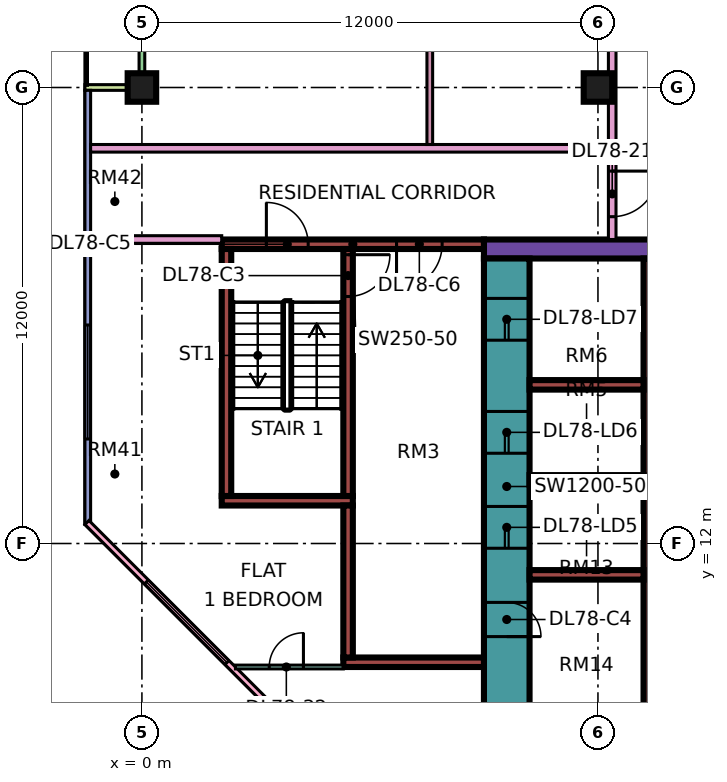
"""IFC4 building model, lengths in metres.
Left out: names, types, materials, properties, quantities, classifications, styles, units other than length and angle.
Written with IfcOpenShell. Run it as: python <this file> out.ifc"""

import sys

from ifc_helpers import new_model, si_unit, direction, frame, frame_2d, origin, origin_2d, place, context, subcontext, project, spatial, rectangle, extrude, element, fill, save


model = new_model("IFC4")
c1 = context("Model", 3, precision=1e-05, world=origin(), true_north=direction((0.0, 1.0)))
c2 = subcontext(c1, "Body", "Model", "MODEL_VIEW")
j1 = project(units=[si_unit("LENGTHUNIT", "METRE"), si_unit("PLANEANGLEUNIT", "RADIAN")], contexts=[c1])
p1 = place(None, origin())
s1 = spatial("IfcSite", under=j1, at=p1, CompositionType="ELEMENT")
p2 = place(p1, origin())
s2 = spatial("IfcBuilding", under=s1, at=p2, CompositionType="ELEMENT")
p3 = place(p2, frame((0.0, 0.0, 338.9)))
s3 = spatial("IfcBuildingStorey", under=s2, at=p3, CompositionType="ELEMENT", Elevation=338.9)
for number, where, z_axis, x_axis in (
    (1, (0.0, 24.0, 0.0), (0.0, 0.0, 1.0), (1.0, 0.0, 0.0)),
    (2, (12.0, 24.0, 0.0), (0.0, 0.0, 1.0), (1.0, 0.0, 0.0)),
):
    element("IfcColumn", number, at=place(p3, frame(where, z_axis=z_axis, x_axis=x_axis)), inside=s3, PredefinedType="COLUMN", context=c2, shape_type="SweptSolid", body=[
        extrude(rectangle(XDim=0.75, YDim=0.75, at=origin_2d()), origin(), (0.0, 0.0, 1.0), 3.75),
    ])
p4 = place(p3, frame((9.0, 19.75, 0.0), z_axis=(0.0, 0.0, 1.0), x_axis=(1.0, 0.0, 0.0)))
e3 = element("IfcWall", 3, at=p4, inside=s3, PredefinedType="SHEAR", context=c2, shape_type="SweptSolid", body=[
    extrude(rectangle(XDim=25.0, YDim=0.5, at=frame_2d((12.5, 0.0))), origin(), (0.0, 0.0, 1.0), 3.75),
])
p5 = place(p4, frame((19.1, 0.0, 0.0)))
e4 = element("IfcOpeningElement", 4, at=p5, cuts=e3, PredefinedType="OPENING", context=c2, shape_type="SweptSolid", body=[
    extrude(rectangle(XDim=1.8, YDim=2.4, at=frame_2d((0.9, 1.2))), frame((0.0, 0.26, 0.0), z_axis=(0.0, -1.0, 0.0), x_axis=(1.0, 0.0, 0.0)), (0.0, 0.0, 1.0), 0.52),
])
p6 = place(p3, frame((9.6, 7.5, 0.0), z_axis=(0.0, 0.0, 1.0), x_axis=(0.0, 1.0, 0.0)))
e5 = element("IfcWall", 5, at=p6, inside=s3, PredefinedType="SHEAR", context=c2, shape_type="SweptSolid", body=[
    extrude(rectangle(XDim=12.0, YDim=1.2, at=frame_2d((6.0, 0.0))), origin(), (0.0, 0.0, 1.0), 3.75),
])
p7 = place(p6, frame((4.375, 0.0, 0.0)))
e6 = element("IfcOpeningElement", 6, at=p7, cuts=e5, PredefinedType="OPENING", context=c2, shape_type="SweptSolid", body=[
    extrude(rectangle(XDim=1.1, YDim=2.2, at=frame_2d((0.55, 1.1))), frame((0.0, 0.61, 0.0), z_axis=(0.0, -1.0, 0.0), x_axis=(1.0, 0.0, 0.0)), (0.0, 0.0, 1.0), 1.22),
])
p8 = place(p6, frame((6.875, 0.0, 0.0)))
e7 = element("IfcOpeningElement", 7, at=p8, cuts=e5, PredefinedType="OPENING", context=c2, shape_type="SweptSolid", body=[
    extrude(rectangle(XDim=1.1, YDim=2.2, at=frame_2d((0.55, 1.1))), frame((0.0, 0.61, 0.0), z_axis=(0.0, -1.0, 0.0), x_axis=(1.0, 0.0, 0.0)), (0.0, 0.0, 1.0), 1.22),
])
p9 = place(p6, frame((9.85, 0.0, 0.0)))
e8 = element("IfcOpeningElement", 8, at=p9, cuts=e5, PredefinedType="OPENING", context=c2, shape_type="SweptSolid", body=[
    extrude(rectangle(XDim=1.1, YDim=2.2, at=frame_2d((0.55, 1.1))), frame((0.0, 0.61, 0.0), z_axis=(0.0, -1.0, 0.0), x_axis=(1.0, 0.0, 0.0)), (0.0, 0.0, 1.0), 1.22),
])
p10 = place(p6, frame((2.05, 0.0, 0.0)))
e9 = element("IfcOpeningElement", 9, at=p10, cuts=e5, PredefinedType="OPENING", context=c2, shape_type="SweptSolid", body=[
    extrude(rectangle(XDim=0.9, YDim=2.1, at=frame_2d((0.45, 1.05))), frame((0.0, 0.61, 0.0), z_axis=(0.0, -1.0, 0.0), x_axis=(1.0, 0.0, 0.0)), (0.0, 0.0, 1.0), 1.22),
])
p11 = place(p3, frame((13.325, 7.5, 0.0), z_axis=(0.0, 0.0, 1.0), x_axis=(0.0, 1.0, 0.0)))
e10 = element("IfcWall", 10, at=p11, inside=s3, PredefinedType="SHEAR", context=c2, shape_type="SweptSolid", body=[
    extrude(rectangle(XDim=12.0, YDim=0.25, at=frame_2d((6.0, 0.0))), origin(), (0.0, 0.0, 1.0), 3.75),
])
for number, where, z_axis, x_axis in (
    (11, (10.2, 11.175, 0.0), (0.0, 0.0, 1.0), (1.0, 0.0, 0.0)),
    (12, (10.2, 13.675, 0.0), (0.0, 0.0, 1.0), (1.0, 0.0, 0.0)),
    (13, (10.2, 16.175, 0.0), (0.0, 0.0, 1.0), (1.0, 0.0, 0.0)),
):
    element("IfcWall", number, at=place(p3, frame(where, z_axis=z_axis, x_axis=x_axis)), inside=s3, PredefinedType="SHEAR", context=c2, shape_type="SweptSolid", body=[
        extrude(rectangle(XDim=3.0, YDim=0.25, at=frame_2d((1.5, 0.0))), origin(), (0.0, 0.0, 1.0), 3.75),
    ])
p12 = place(p3, frame((2.1, 19.875, 0.0), z_axis=(0.0, 0.0, 1.0), x_axis=(1.0, 0.0, 0.0)))
e14 = element("IfcWall", 14, at=p12, inside=s3, PredefinedType="SHEAR", context=c2, shape_type="SweptSolid", body=[
    extrude(rectangle(XDim=6.9, YDim=0.25, at=frame_2d((3.45, 0.0))), origin(), (0.0, 0.0, 1.0), 3.75),
])
p13 = place(p12, frame((1.175, 0.0, 0.0)))
e15 = element("IfcOpeningElement", 15, at=p13, cuts=e14, PredefinedType="OPENING", context=c2, shape_type="SweptSolid", body=[
    extrude(rectangle(XDim=1.1, YDim=2.2, at=frame_2d((0.55, 1.1))), frame((0.0, 0.135, 0.0), z_axis=(0.0, -1.0, 0.0), x_axis=(1.0, 0.0, 0.0)), (0.0, 0.0, 1.0), 0.27),
])
p14 = place(p12, frame((4.6, 0.0, 0.0)))
e16 = element("IfcOpeningElement", 16, at=p14, cuts=e14, PredefinedType="OPENING", context=c2, shape_type="SweptSolid", body=[
    extrude(rectangle(XDim=1.2, YDim=2.2, at=frame_2d((0.6, 1.1))), frame((0.0, 0.135, 0.0), z_axis=(0.0, -1.0, 0.0), x_axis=(1.0, 0.0, 0.0)), (0.0, 0.0, 1.0), 0.27),
])
p15 = place(p3, frame((2.1, 13.125, 0.0), z_axis=(0.0, 0.0, 1.0), x_axis=(1.0, 0.0, 0.0)))
e17 = element("IfcWall", 17, at=p15, inside=s3, PredefinedType="SHEAR", context=c2, shape_type="SweptSolid", body=[
    extrude(rectangle(XDim=3.45, YDim=0.25, at=frame_2d((1.725, 0.0))), origin(), (0.0, 0.0, 1.0), 3.75),
])
p16 = place(p3, frame((2.225, 13.25, 0.0), z_axis=(0.0, 0.0, 1.0), x_axis=(0.0, 1.0, 0.0)))
e18 = element("IfcWall", 18, at=p16, inside=s3, PredefinedType="SHEAR", context=c2, shape_type="SweptSolid", body=[
    extrude(rectangle(XDim=6.5, YDim=0.25, at=frame_2d((3.25, 0.0))), origin(), (0.0, 0.0, 1.0), 3.75),
])
p17 = place(p3, frame((5.425, 13.25, 0.0), z_axis=(0.0, 0.0, 1.0), x_axis=(0.0, 1.0, 0.0)))
e19 = element("IfcWall", 19, at=p17, inside=s3, PredefinedType="SHEAR", context=c2, shape_type="SweptSolid", body=[
    extrude(rectangle(XDim=6.5, YDim=0.25, at=frame_2d((3.25, 0.0))), origin(), (0.0, 0.0, 1.0), 3.75),
])
p18 = place(p17, frame((5.25, 0.0, 0.0)))
e20 = element("IfcOpeningElement", 20, at=p18, cuts=e19, PredefinedType="OPENING", context=c2, shape_type="SweptSolid", body=[
    extrude(rectangle(XDim=1.1, YDim=2.2, at=frame_2d((0.55, 1.1))), frame((0.0, 0.135, 0.0), z_axis=(0.0, -1.0, 0.0), x_axis=(1.0, 0.0, 0.0)), (0.0, 0.0, 1.0), 0.27),
])
p19 = place(p3, frame((5.3, 8.875, 0.0), z_axis=(0.0, 0.0, 1.0), x_axis=(1.0, 0.0, 0.0)))
e21 = element("IfcWall", 21, at=p19, inside=s3, PredefinedType="SHEAR", context=c2, shape_type="SweptSolid", body=[
    extrude(rectangle(XDim=3.7, YDim=0.25, at=frame_2d((1.85, 0.0))), origin(), (0.0, 0.0, 1.0), 3.75),
])
p20 = place(p3, frame((5.425, 9.0, 0.0), z_axis=(0.0, 0.0, 1.0), x_axis=(0.0, 1.0, 0.0)))
e22 = element("IfcWall", 22, at=p20, inside=s3, PredefinedType="SHEAR", context=c2, shape_type="SweptSolid", body=[
    extrude(rectangle(XDim=4.0, YDim=0.25, at=frame_2d((2.0, 0.0))), origin(), (0.0, 0.0, 1.0), 3.75),
])
p21 = place(p3, frame((0.0, 35.925, 0.0), z_axis=(0.0, 0.0, 1.0), x_axis=(0.0, -1.0, 0.0)))
e23 = element("IfcWall", 23, at=p21, inside=s3, PredefinedType="SOLIDWALL", context=c2, shape_type="SweptSolid", body=[
    extrude(rectangle(XDim=11.85, YDim=0.15, at=frame_2d((5.925, 0.0))), origin(), (0.0, 0.0, 1.0), 3.35),
])
p22 = place(p21, frame((2.262, 0.0, 0.0)))
e24 = element("IfcOpeningElement", 24, at=p22, cuts=e23, PredefinedType="OPENING", context=c2, shape_type="SweptSolid", body=[
    extrude(rectangle(XDim=1.8, YDim=2.4, at=frame_2d((0.9, 1.2))), frame((0.0, 0.085, 0.0), z_axis=(0.0, -1.0, 0.0), x_axis=(1.0, 0.0, 0.0)), (0.0, 0.0, 1.0), 0.17),
])
p23 = place(p21, frame((7.188, 0.0, 0.45)))
e25 = element("IfcOpeningElement", 25, at=p23, cuts=e23, PredefinedType="OPENING", context=c2, shape_type="SweptSolid", body=[
    extrude(rectangle(XDim=3.0, YDim=2.4, at=frame_2d((1.5, 1.2))), frame((0.0, 0.085, 0.0), z_axis=(0.0, -1.0, 0.0), x_axis=(1.0, 0.0, 0.0)), (0.0, 0.0, 1.0), 0.17),
])
p24 = place(p3, frame((-1.5, 24.0, 0.0), z_axis=(0.0, 0.0, 1.0), x_axis=(1.0, 0.0, 0.0)))
e26 = element("IfcWall", 26, at=p24, inside=s3, PredefinedType="SOLIDWALL", context=c2, shape_type="SweptSolid", body=[
    extrude(rectangle(XDim=1.5, YDim=0.15, at=frame_2d((0.75, 0.0))), origin(), (0.0, 0.0, 1.0), 3.35),
])
p25 = place(p3, frame((-1.425, 23.925, 0.0), z_axis=(0.0, 0.0, 1.0), x_axis=(0.0, -1.0, 0.0)))
e27 = element("IfcWall", 27, at=p25, inside=s3, PredefinedType="SOLIDWALL", context=c2, shape_type="SweptSolid", body=[
    extrude(rectangle(XDim=11.425, YDim=0.15, at=frame_2d((5.712, 0.0))), origin(), (0.0, 0.0, 1.0), 3.35),
])
p26 = place(p25, frame((6.175, 0.0, 0.45)))
e28 = element("IfcOpeningElement", 28, at=p26, cuts=e27, PredefinedType="OPENING", context=c2, shape_type="SweptSolid", body=[
    extrude(rectangle(XDim=3.0, YDim=2.4, at=frame_2d((1.5, 1.2))), frame((0.0, 0.085, 0.0), z_axis=(0.0, -1.0, 0.0), x_axis=(1.0, 0.0, 0.0)), (0.0, 0.0, 1.0), 0.17),
])
p27 = place(p3, frame((-1.447, 12.553, 0.0), z_axis=(0.0, 0.0, 1.0), x_axis=(0.707106781187, -0.707106781187, 0.0)))
e29 = element("IfcWall", 29, at=p27, inside=s3, PredefinedType="SOLIDWALL", context=c2, shape_type="SweptSolid", body=[
    extrude(rectangle(XDim=19.799, YDim=0.15, at=frame_2d((9.899, 0.0))), origin(), (0.0, 0.0, 1.0), 3.35),
])
p28 = place(p27, frame((2.212, 0.0, 0.45)))
e30 = element("IfcOpeningElement", 30, at=p28, cuts=e29, PredefinedType="OPENING", context=c2, shape_type="SweptSolid", body=[
    extrude(rectangle(XDim=3.0, YDim=2.4, at=frame_2d((1.5, 1.2))), frame((0.0, 0.085, 0.0), z_axis=(0.0, -1.0, 0.0), x_axis=(1.0, 0.0, 0.0)), (0.0, 0.0, 1.0), 0.17),
])
p29 = place(p27, frame((10.216, 0.0, 0.45)))
e31 = element("IfcOpeningElement", 31, at=p29, cuts=e29, PredefinedType="OPENING", context=c2, shape_type="SweptSolid", body=[
    extrude(rectangle(XDim=3.0, YDim=2.4, at=frame_2d((1.5, 1.2))), frame((0.0, 0.085, 0.0), z_axis=(0.0, -1.0, 0.0), x_axis=(1.0, 0.0, 0.0)), (0.0, 0.0, 1.0), 0.17),
])
p30 = place(p3, frame((-1.35, 20.0, 0.0), z_axis=(0.0, 0.0, 1.0), x_axis=(1.0, 0.0, 0.0)))
e32 = element("IfcWall", 32, at=p30, inside=s3, PredefinedType="PARTITIONING", context=c2, shape_type="SweptSolid", body=[
    extrude(rectangle(XDim=3.45, YDim=0.2, at=frame_2d((1.725, 0.0))), origin(), (0.0, 0.0, 1.0), 3.35),
])
p31 = place(p3, frame((-1.35, 22.4, 0.0), z_axis=(0.0, 0.0, 1.0), x_axis=(1.0, 0.0, 0.0)))
e33 = element("IfcWall", 33, at=p31, inside=s3, PredefinedType="PARTITIONING", context=c2, shape_type="SweptSolid", body=[
    extrude(rectangle(XDim=13.625, YDim=0.2, at=frame_2d((6.812, 0.0))), origin(), (0.0, 0.0, 1.0), 3.35),
])
p32 = place(p3, frame((2.461, 8.75, 0.0), z_axis=(0.0, 0.0, 1.0), x_axis=(1.0, 0.0, 0.0)))
e34 = element("IfcWall", 34, at=p32, inside=s3, PredefinedType="PARTITIONING", context=c2, shape_type="SweptSolid", body=[
    extrude(rectangle(XDim=2.839, YDim=0.1, at=frame_2d((1.419, 0.0))), origin(), (0.0, 0.0, 1.0), 3.35),
])
p33 = place(p32, frame((0.889, 0.0, 0.0)))
e35 = element("IfcOpeningElement", 35, at=p33, cuts=e34, PredefinedType="OPENING", context=c2, shape_type="SweptSolid", body=[
    extrude(rectangle(XDim=0.9, YDim=2.1, at=frame_2d((0.45, 1.05))), frame((0.0, 0.06, 0.0), z_axis=(0.0, -1.0, 0.0), x_axis=(1.0, 0.0, 0.0)), (0.0, 0.0, 1.0), 0.12),
])
p34 = place(p3, frame((7.575, 22.5, 0.0), z_axis=(0.0, 0.0, 1.0), x_axis=(0.0, 1.0, 0.0)))
e36 = element("IfcWall", 36, at=p34, inside=s3, PredefinedType="PARTITIONING", context=c2, shape_type="SweptSolid", body=[
    extrude(rectangle(XDim=10.875, YDim=0.15, at=frame_2d((5.438, 0.0))), origin(), (0.0, 0.0, 1.0), 3.35),
])
p35 = place(p34, frame((8.85, 0.0, 0.0)))
e37 = element("IfcOpeningElement", 37, at=p35, cuts=e36, PredefinedType="OPENING", context=c2, shape_type="SweptSolid", body=[
    extrude(rectangle(XDim=0.8, YDim=2.1, at=frame_2d((0.4, 1.05))), frame((0.0, 0.085, 0.0), z_axis=(0.0, -1.0, 0.0), x_axis=(1.0, 0.0, 0.0)), (0.0, 0.0, 1.0), 0.17),
])
p36 = place(p34, frame((3.35, 0.0, 0.0)))
e38 = element("IfcOpeningElement", 38, at=p36, cuts=e36, PredefinedType="OPENING", context=c2, shape_type="SweptSolid", body=[
    extrude(rectangle(XDim=0.9, YDim=2.1, at=frame_2d((0.45, 1.05))), frame((0.0, 0.085, 0.0), z_axis=(0.0, -1.0, 0.0), x_axis=(1.0, 0.0, 0.0)), (0.0, 0.0, 1.0), 0.17),
])
p37 = place(p3, frame((12.375, 20.0, 0.0), z_axis=(0.0, 0.0, 1.0), x_axis=(0.0, 1.0, 0.0)))
e39 = element("IfcWall", 39, at=p37, inside=s3, PredefinedType="PARTITIONING", context=c2, shape_type="SweptSolid", body=[
    extrude(rectangle(XDim=34.0, YDim=0.2, at=frame_2d((17.0, 0.0))), origin(), (0.0, 0.0, 1.0), 3.35),
])
p38 = place(p37, frame((31.8, 0.0, 0.0)))
e40 = element("IfcOpeningElement", 40, at=p38, cuts=e39, PredefinedType="OPENING", context=c2, shape_type="SweptSolid", body=[
    extrude(rectangle(XDim=1.0, YDim=2.1, at=frame_2d((0.5, 1.05))), frame((0.0, 0.11, 0.0), z_axis=(0.0, -1.0, 0.0), x_axis=(1.0, 0.0, 0.0)), (0.0, 0.0, 1.0), 0.22),
])
p39 = place(p37, frame((0.6, 0.0, 0.0)))
e41 = element("IfcOpeningElement", 41, at=p39, cuts=e39, PredefinedType="OPENING", context=c2, shape_type="SweptSolid", body=[
    extrude(rectangle(XDim=1.2, YDim=2.1, at=frame_2d((0.6, 1.05))), frame((0.0, 0.11, 0.0), z_axis=(0.0, -1.0, 0.0), x_axis=(1.0, 0.0, 0.0)), (0.0, 0.0, 1.0), 0.22),
])
p40 = place(p37, frame((14.1, 0.0, 0.0)))
e42 = element("IfcOpeningElement", 42, at=p40, cuts=e39, PredefinedType="OPENING", context=c2, shape_type="SweptSolid", body=[
    extrude(rectangle(XDim=1.0, YDim=2.1, at=frame_2d((0.5, 1.05))), frame((0.0, 0.11, 0.0), z_axis=(0.0, -1.0, 0.0), x_axis=(1.0, 0.0, 0.0)), (0.0, 0.0, 1.0), 0.22),
])
p41 = place(p26, origin())
e43 = element("IfcWindow", 43, at=p41, inside=s3, PartitioningType="SINGLE_PANEL", PredefinedType="WINDOW", context=c2, shape_type="SweptSolid", body=[
    extrude(rectangle(XDim=3.0, YDim=2.4, at=frame_2d((1.5, 1.2))), frame((0.0, 0.03, 0.0), z_axis=(0.0, -1.0, 0.0), x_axis=(1.0, 0.0, 0.0)), (0.0, 0.0, 1.0), 0.06),
])
fill(e28, e43)
p42 = place(p28, origin())
e44 = element("IfcWindow", 44, at=p42, inside=s3, PartitioningType="SINGLE_PANEL", PredefinedType="WINDOW", context=c2, shape_type="SweptSolid", body=[
    extrude(rectangle(XDim=3.0, YDim=2.4, at=frame_2d((1.5, 1.2))), frame((0.0, 0.03, 0.0), z_axis=(0.0, -1.0, 0.0), x_axis=(1.0, 0.0, 0.0)), (0.0, 0.0, 1.0), 0.06),
])
fill(e30, e44)
p43 = place(p7, origin())
e45 = element("IfcDoor", 45, at=p43, inside=s3, OperationType="DOUBLE_DOOR_SLIDING", PredefinedType="DOOR", context=c2, shape_type="SweptSolid", body=[
    extrude(rectangle(XDim=1.1, YDim=2.2, at=frame_2d((0.55, 1.1))), frame((0.0, 0.025, 0.0), z_axis=(0.0, -1.0, 0.0), x_axis=(1.0, 0.0, 0.0)), (0.0, 0.0, 1.0), 0.05),
])
fill(e6, e45)
p44 = place(p8, origin())
e46 = element("IfcDoor", 46, at=p44, inside=s3, OperationType="DOUBLE_DOOR_SLIDING", PredefinedType="DOOR", context=c2, shape_type="SweptSolid", body=[
    extrude(rectangle(XDim=1.1, YDim=2.2, at=frame_2d((0.55, 1.1))), frame((0.0, 0.025, 0.0), z_axis=(0.0, -1.0, 0.0), x_axis=(1.0, 0.0, 0.0)), (0.0, 0.0, 1.0), 0.05),
])
fill(e7, e46)
p45 = place(p9, origin())
e47 = element("IfcDoor", 47, at=p45, inside=s3, OperationType="DOUBLE_DOOR_SLIDING", PredefinedType="DOOR", context=c2, shape_type="SweptSolid", body=[
    extrude(rectangle(XDim=1.1, YDim=2.2, at=frame_2d((0.55, 1.1))), frame((0.0, 0.025, 0.0), z_axis=(0.0, -1.0, 0.0), x_axis=(1.0, 0.0, 0.0)), (0.0, 0.0, 1.0), 0.05),
])
fill(e8, e47)
p46 = place(p18, origin())
e48 = element("IfcDoor", 48, at=p46, inside=s3, OperationType="SINGLE_SWING_RIGHT", PredefinedType="DOOR", context=c2, shape_type="SweptSolid", body=[
    extrude(rectangle(XDim=1.1, YDim=2.2, at=frame_2d((0.55, 1.1))), frame((0.0, 0.025, 0.0), z_axis=(0.0, -1.0, 0.0), x_axis=(1.0, 0.0, 0.0)), (0.0, 0.0, 1.0), 0.05),
])
fill(e20, e48)
p47 = place(p10, frame((0.9, 0.0, 0.0), z_axis=(0.0, 0.0, 1.0), x_axis=(-1.0, 0.0, 0.0)))
e49 = element("IfcDoor", 49, at=p47, inside=s3, OperationType="SINGLE_SWING_LEFT", PredefinedType="DOOR", context=c2, shape_type="SweptSolid", body=[
    extrude(rectangle(XDim=0.9, YDim=2.1, at=frame_2d((0.45, 1.05))), frame((0.0, 0.025, 0.0), z_axis=(0.0, -1.0, 0.0), x_axis=(1.0, 0.0, 0.0)), (0.0, 0.0, 1.0), 0.05),
])
fill(e9, e49)
p48 = place(p13, origin())
e50 = element("IfcDoor", 50, at=p48, inside=s3, OperationType="SINGLE_SWING_LEFT", PredefinedType="DOOR", context=c2, shape_type="SweptSolid", body=[
    extrude(rectangle(XDim=1.1, YDim=2.2, at=frame_2d((0.55, 1.1))), frame((0.0, 0.025, 0.0), z_axis=(0.0, -1.0, 0.0), x_axis=(1.0, 0.0, 0.0)), (0.0, 0.0, 1.0), 0.05),
])
fill(e15, e50)
p49 = place(p14, frame((1.2, 0.0, 0.0), z_axis=(0.0, 0.0, 1.0), x_axis=(-1.0, 0.0, 0.0)))
e51 = element("IfcDoor", 51, at=p49, inside=s3, OperationType="SINGLE_SWING_LEFT", PredefinedType="DOOR", context=c2, shape_type="SweptSolid", body=[
    extrude(rectangle(XDim=1.2, YDim=2.2, at=frame_2d((0.6, 1.1))), frame((0.0, 0.025, 0.0), z_axis=(0.0, -1.0, 0.0), x_axis=(1.0, 0.0, 0.0)), (0.0, 0.0, 1.0), 0.05),
])
fill(e16, e51)
p50 = place(p39, origin())
e52 = element("IfcDoor", 52, at=p50, inside=s3, OperationType="SINGLE_SWING_RIGHT", PredefinedType="DOOR", context=c2, shape_type="SweptSolid", body=[
    extrude(rectangle(XDim=1.2, YDim=2.1, at=frame_2d((0.6, 1.05))), frame((0.0, 0.025, 0.0), z_axis=(0.0, -1.0, 0.0), x_axis=(1.0, 0.0, 0.0)), (0.0, 0.0, 1.0), 0.05),
])
fill(e41, e52)
p51 = place(p33, frame((0.9, 0.0, 0.0), z_axis=(0.0, 0.0, 1.0), x_axis=(-1.0, 0.0, 0.0)))
e53 = element("IfcDoor", 53, at=p51, inside=s3, OperationType="SINGLE_SWING_RIGHT", PredefinedType="DOOR", context=c2, shape_type="SweptSolid", body=[
    extrude(rectangle(XDim=0.9, YDim=2.1, at=frame_2d((0.45, 1.05))), frame((0.0, 0.025, 0.0), z_axis=(0.0, -1.0, 0.0), x_axis=(1.0, 0.0, 0.0)), (0.0, 0.0, 1.0), 0.05),
])
fill(e35, e53)
save(model, sys.argv[1])
